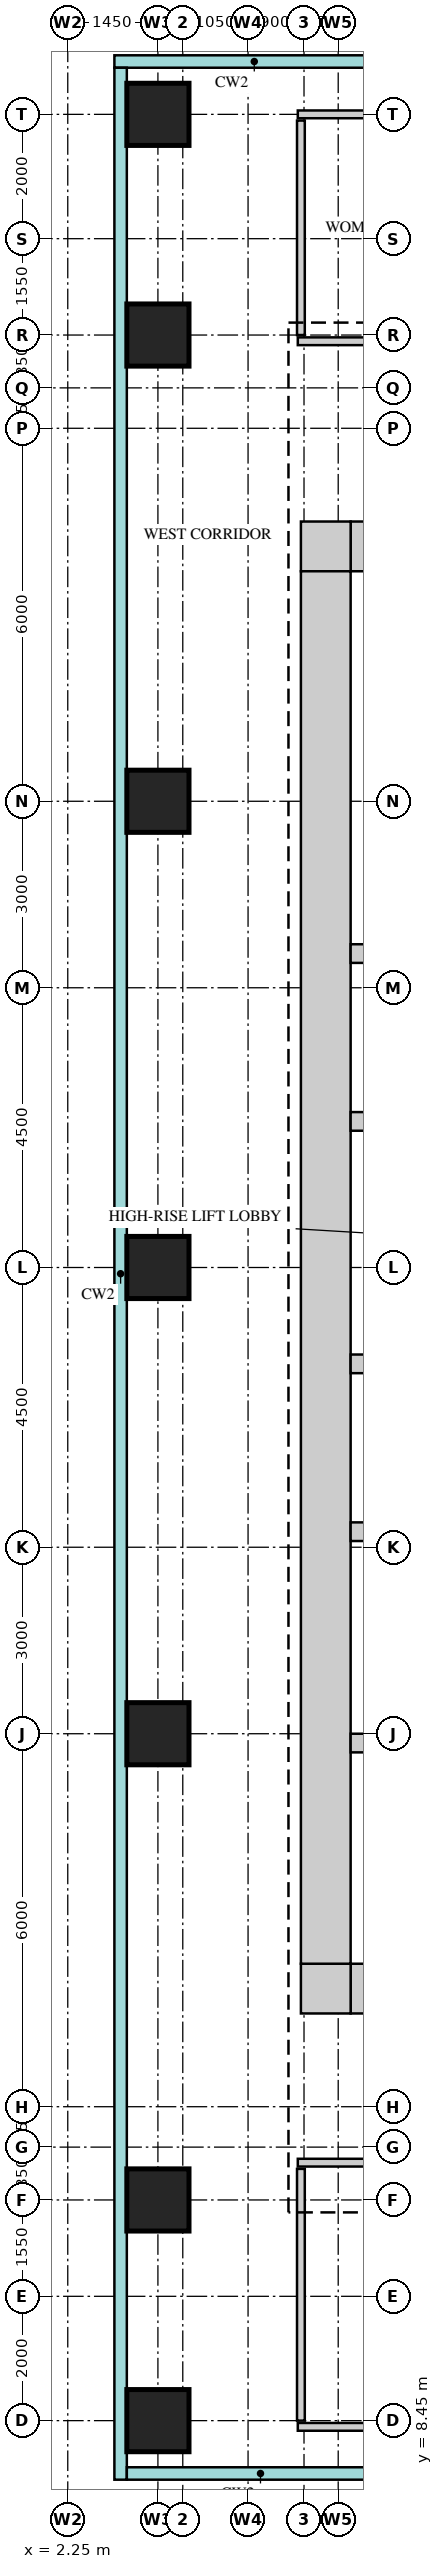
"""IFC4 building model, lengths in metres.
Left out: names, types, materials, properties, quantities, classifications, styles, units other than length and angle.
Written with IfcOpenShell. Run it as: python <this file> out.ifc"""

import sys

from ifc_helpers import new_model, si_unit, direction, frame, frame_2d, origin, origin_2d, place, context, subcontext, project, spatial, rectangle, extrude, source, transform, mapped, element, save


model = new_model("IFC4")
c1 = context("Model", 3, precision=1e-05, world=origin(), true_north=direction((0.0, 1.0)))
c2 = subcontext(c1, "Body", "Model", "MODEL_VIEW")
j1 = project(units=[si_unit("LENGTHUNIT", "METRE"), si_unit("PLANEANGLEUNIT", "RADIAN")], contexts=[c1])
p1 = place(None, origin())
s1 = spatial("IfcSite", under=j1, at=p1, CompositionType="ELEMENT")
p2 = place(p1, origin())
s2 = spatial("IfcBuilding", under=s1, at=p2, CompositionType="ELEMENT")
p3 = place(p2, frame((0.0, 0.0, 196.7)))
s3 = spatial("IfcBuildingStorey", under=s2, at=p3, CompositionType="ELEMENT", Elevation=196.7)
m1 = source(origin(), c2, "Body", "SweptSolid", [
    extrude(rectangle(XDim=13.4, YDim=0.8, at=frame_2d((6.7, 0.0))), origin(), (0.0, 0.0, 1.0), 3.75),
])
p4 = place(p3, frame((6.8, 38.6, 0.0), z_axis=(0.0, 0.0, 1.0), x_axis=(1.0, 0.0, 0.0)))
e1 = element("IfcWall", 1, at=p4, inside=s3, PredefinedType="SHEAR", context=c2, shape_type="MappedRepresentation", body=[
    mapped(m1, transform((0.0, 0.0, 0.0))),
])
m2 = source(origin(), c2, "Body", "SweptSolid", [
    extrude(rectangle(XDim=0.9, YDim=2.1, at=frame_2d((0.45, 1.05))), frame((0.0, 0.41, 0.0), z_axis=(0.0, -1.0, 0.0), x_axis=(1.0, 0.0, 0.0)), (0.0, 0.0, 1.0), 0.82),
])
p5 = place(p4, frame((1.75, 0.0, 0.0)))
e2 = element("IfcOpeningElement", 2, at=p5, cuts=e1, PredefinedType="OPENING", context=c2, shape_type="MappedRepresentation", body=[
    mapped(m2, transform((0.0, 0.0, 0.0))),
])
p6 = place(p4, frame((8.45, 0.0, 0.0)))
e3 = element("IfcOpeningElement", 3, at=p6, cuts=e1, PredefinedType="OPENING", context=c2, shape_type="MappedRepresentation", body=[
    mapped(m2, transform((0.0, 0.0, 0.0))),
])
m3 = source(origin(), c2, "Body", "SweptSolid", [
    extrude(rectangle(XDim=0.8, YDim=0.8, at=frame_2d((0.4, 0.0))), origin(), (0.0, 0.0, 1.0), 3.75),
])
p7 = place(p3, frame((6.0, 38.6, 0.0), z_axis=(0.0, 0.0, 1.0), x_axis=(1.0, 0.0, 0.0)))
e4 = element("IfcWall", 4, at=p7, inside=s3, PredefinedType="SHEAR", context=c2, shape_type="MappedRepresentation", body=[
    mapped(m3, transform((0.0, 0.0, 0.0))),
])
p8 = place(p3, frame((6.8, 15.4, 0.0), z_axis=(0.0, 0.0, 1.0), x_axis=(1.0, 0.0, 0.0)))
e5 = element("IfcWall", 5, at=p8, inside=s3, PredefinedType="SHEAR", context=c2, shape_type="MappedRepresentation", body=[
    mapped(m1, transform((0.0, 0.0, 0.0))),
])
m4 = source(origin(), c2, "Body", "SweptSolid", [
    extrude(rectangle(XDim=1.2, YDim=2.1, at=frame_2d((0.6, 1.05))), frame((0.0, 0.41, 0.0), z_axis=(0.0, -1.0, 0.0), x_axis=(1.0, 0.0, 0.0)), (0.0, 0.0, 1.0), 0.82),
])
p9 = place(p8, frame((5.4, 0.0, 0.0)))
e6 = element("IfcOpeningElement", 6, at=p9, cuts=e5, PredefinedType="OPENING", context=c2, shape_type="MappedRepresentation", body=[
    mapped(m4, transform((0.0, 0.0, 0.0))),
])
p10 = place(p8, frame((2.05, 0.0, 0.0)))
e7 = element("IfcOpeningElement", 7, at=p10, cuts=e5, PredefinedType="OPENING", context=c2, shape_type="MappedRepresentation", body=[
    mapped(m4, transform((0.0, 0.0, 0.0))),
])
m5 = source(origin(), c2, "Body", "SweptSolid", [
    extrude(rectangle(XDim=1.0, YDim=2.1, at=frame_2d((0.5, 1.05))), frame((0.0, 0.41, 0.0), z_axis=(0.0, -1.0, 0.0), x_axis=(1.0, 0.0, 0.0)), (0.0, 0.0, 1.0), 0.82),
])
p11 = place(p8, frame((7.9, 0.0, 0.0)))
e8 = element("IfcOpeningElement", 8, at=p11, cuts=e5, PredefinedType="OPENING", context=c2, shape_type="MappedRepresentation", body=[
    mapped(m5, transform((0.0, 0.0, 0.0))),
])
p12 = place(p3, frame((6.0, 15.4, 0.0), z_axis=(0.0, 0.0, 1.0), x_axis=(1.0, 0.0, 0.0)))
e9 = element("IfcWall", 9, at=p12, inside=s3, PredefinedType="SHEAR", context=c2, shape_type="MappedRepresentation", body=[
    mapped(m3, transform((0.0, 0.0, 0.0))),
])
m6 = source(origin(), c2, "Body", "SweptSolid", [
    extrude(rectangle(XDim=22.4, YDim=0.8, at=frame_2d((11.2, 0.0))), origin(), (0.0, 0.0, 1.0), 3.75),
])
p13 = place(p3, frame((6.4, 15.8, 0.0), z_axis=(0.0, 0.0, 1.0), x_axis=(0.0, 1.0, 0.0)))
e10 = element("IfcWall", 10, at=p13, inside=s3, PredefinedType="SHEAR", context=c2, shape_type="MappedRepresentation", body=[
    mapped(m6, transform((0.0, 0.0, 0.0))),
])
m7 = source(origin(), c2, "Body", "SweptSolid", [
    extrude(rectangle(XDim=13.4, YDim=0.3, at=frame_2d((6.7, 0.0))), origin(), (0.0, 0.0, 1.0), 3.75),
])
p14 = place(p3, frame((6.8, 22.75, 0.0), z_axis=(0.0, 0.0, 1.0), x_axis=(1.0, 0.0, 0.0)))
e11 = element("IfcWall", 11, at=p14, inside=s3, PredefinedType="STANDARD", context=c2, shape_type="MappedRepresentation", body=[
    mapped(m7, transform((0.0, 0.0, 0.0))),
])
m8 = source(origin(), c2, "Body", "SweptSolid", [
    extrude(rectangle(XDim=9.275, YDim=0.3, at=frame_2d((4.637, 0.0))), origin(), (0.0, 0.0, 1.0), 3.75),
])
p15 = place(p3, frame((6.8, 19.35, 0.0), z_axis=(0.0, 0.0, 1.0), x_axis=(1.0, 0.0, 0.0)))
e12 = element("IfcWall", 12, at=p15, inside=s3, PredefinedType="STANDARD", context=c2, shape_type="MappedRepresentation", body=[
    mapped(m8, transform((0.0, 0.0, 0.0))),
])
m9 = source(origin(), c2, "Body", "SweptSolid", [
    extrude(rectangle(XDim=1.2, YDim=2.1, at=frame_2d((0.6, 1.05))), frame((0.0, 0.16, 0.0), z_axis=(0.0, -1.0, 0.0), x_axis=(1.0, 0.0, 0.0)), (0.0, 0.0, 1.0), 0.32),
])
p16 = place(p15, frame((0.85, 0.0, 0.0)))
e13 = element("IfcOpeningElement", 13, at=p16, cuts=e12, PredefinedType="OPENING", context=c2, shape_type="MappedRepresentation", body=[
    mapped(m9, transform((0.0, 0.0, 0.0))),
])
p17 = place(p15, frame((3.2, 0.0, 0.0)))
e14 = element("IfcOpeningElement", 14, at=p17, cuts=e12, PredefinedType="OPENING", context=c2, shape_type="MappedRepresentation", body=[
    mapped(m9, transform((0.0, 0.0, 0.0))),
])
p18 = place(p15, frame((5.45, 0.0, 0.0)))
e15 = element("IfcOpeningElement", 15, at=p18, cuts=e12, PredefinedType="OPENING", context=c2, shape_type="MappedRepresentation", body=[
    mapped(m9, transform((0.0, 0.0, 0.0))),
])
p19 = place(p15, frame((7.6, 0.0, 0.0)))
e16 = element("IfcOpeningElement", 16, at=p19, cuts=e12, PredefinedType="OPENING", context=c2, shape_type="MappedRepresentation", body=[
    mapped(m9, transform((0.0, 0.0, 0.0))),
])
p20 = place(p3, frame((6.8, 32.05, 0.0), z_axis=(0.0, 0.0, 1.0), x_axis=(1.0, 0.0, 0.0)))
e17 = element("IfcWall", 17, at=p20, inside=s3, PredefinedType="STANDARD", context=c2, shape_type="MappedRepresentation", body=[
    mapped(m7, transform((0.0, 0.0, 0.0))),
])
p21 = place(p3, frame((6.8, 29.35, 0.0), z_axis=(0.0, 0.0, 1.0), x_axis=(1.0, 0.0, 0.0)))
e18 = element("IfcWall", 18, at=p21, inside=s3, PredefinedType="STANDARD", context=c2, shape_type="MappedRepresentation", body=[
    mapped(m7, transform((0.0, 0.0, 0.0))),
])
p22 = place(p21, frame((0.95, 0.0, 0.0)))
e19 = element("IfcOpeningElement", 19, at=p22, cuts=e18, PredefinedType="OPENING", context=c2, shape_type="MappedRepresentation", body=[
    mapped(m9, transform((0.0, 0.0, 0.0))),
])
p23 = place(p21, frame((3.5, 0.0, 0.0)))
e20 = element("IfcOpeningElement", 20, at=p23, cuts=e18, PredefinedType="OPENING", context=c2, shape_type="MappedRepresentation", body=[
    mapped(m9, transform((0.0, 0.0, 0.0))),
])
p24 = place(p21, frame((6.05, 0.0, 0.0)))
e21 = element("IfcOpeningElement", 21, at=p24, cuts=e18, PredefinedType="OPENING", context=c2, shape_type="MappedRepresentation", body=[
    mapped(m9, transform((0.0, 0.0, 0.0))),
])
p25 = place(p21, frame((8.6, 0.0, 0.0)))
e22 = element("IfcOpeningElement", 22, at=p25, cuts=e18, PredefinedType="OPENING", context=c2, shape_type="MappedRepresentation", body=[
    mapped(m9, transform((0.0, 0.0, 0.0))),
])
p26 = place(p21, frame((11.15, 0.0, 0.0)))
e23 = element("IfcOpeningElement", 23, at=p26, cuts=e18, PredefinedType="OPENING", context=c2, shape_type="MappedRepresentation", body=[
    mapped(m9, transform((0.0, 0.0, 0.0))),
])
p27 = place(p3, frame((6.8, 25.45, 0.0), z_axis=(0.0, 0.0, 1.0), x_axis=(1.0, 0.0, 0.0)))
e24 = element("IfcWall", 24, at=p27, inside=s3, PredefinedType="STANDARD", context=c2, shape_type="MappedRepresentation", body=[
    mapped(m7, transform((0.0, 0.0, 0.0))),
])
p28 = place(p27, frame((0.95, 0.0, 0.0)))
e25 = element("IfcOpeningElement", 25, at=p28, cuts=e24, PredefinedType="OPENING", context=c2, shape_type="MappedRepresentation", body=[
    mapped(m9, transform((0.0, 0.0, 0.0))),
])
p29 = place(p27, frame((3.5, 0.0, 0.0)))
e26 = element("IfcOpeningElement", 26, at=p29, cuts=e24, PredefinedType="OPENING", context=c2, shape_type="MappedRepresentation", body=[
    mapped(m9, transform((0.0, 0.0, 0.0))),
])
p30 = place(p27, frame((6.05, 0.0, 0.0)))
e27 = element("IfcOpeningElement", 27, at=p30, cuts=e24, PredefinedType="OPENING", context=c2, shape_type="MappedRepresentation", body=[
    mapped(m9, transform((0.0, 0.0, 0.0))),
])
p31 = place(p27, frame((8.6, 0.0, 0.0)))
e28 = element("IfcOpeningElement", 28, at=p31, cuts=e24, PredefinedType="OPENING", context=c2, shape_type="MappedRepresentation", body=[
    mapped(m9, transform((0.0, 0.0, 0.0))),
])
p32 = place(p27, frame((11.15, 0.0, 0.0)))
e29 = element("IfcOpeningElement", 29, at=p32, cuts=e24, PredefinedType="OPENING", context=c2, shape_type="MappedRepresentation", body=[
    mapped(m9, transform((0.0, 0.0, 0.0))),
])
m10 = source(origin(), c2, "Body", "SweptSolid", [
    extrude(rectangle(XDim=1.0, YDim=1.0, at=origin_2d()), origin(), (0.0, 0.0, 1.0), 3.75),
])
for number, where, z_axis, x_axis in (
    (30, (3.7, 8.45, 0.0), (0.0, 0.0, 1.0), (1.0, 0.0, 0.0)),
    (31, (3.7, 12.0, 0.0), (0.0, 0.0, 1.0), (1.0, 0.0, 0.0)),
    (32, (3.7, 19.5, 0.0), (0.0, 0.0, 1.0), (1.0, 0.0, 0.0)),
    (33, (3.7, 27.0, 0.0), (0.0, 0.0, 1.0), (1.0, 0.0, 0.0)),
    (34, (3.7, 34.5, 0.0), (0.0, 0.0, 1.0), (1.0, 0.0, 0.0)),
    (35, (3.7, 42.0, 0.0), (0.0, 0.0, 1.0), (1.0, 0.0, 0.0)),
    (36, (3.7, 45.55, 0.0), (0.0, 0.0, 1.0), (1.0, 0.0, 0.0)),
):
    element("IfcColumn", number, at=place(p3, frame(where, z_axis=z_axis, x_axis=x_axis)), inside=s3, PredefinedType="COLUMN", context=c2, shape_type="MappedRepresentation", body=[
        mapped(m10, transform((0.0, 0.0, 0.0))),
    ])
m11 = source(origin(), c2, "Body", "SweptSolid", [
    extrude(rectangle(XDim=7.95, YDim=0.125, at=frame_2d((3.975, 0.0))), origin(), (0.0, 0.0, 1.0), 3.25),
])
p33 = place(p3, frame((5.95, 8.35, 0.0), z_axis=(0.0, 0.0, 1.0), x_axis=(1.0, 0.0, 0.0)))
e37 = element("IfcWall", 37, at=p33, inside=s3, PredefinedType="PARTITIONING", context=c2, shape_type="MappedRepresentation", body=[
    mapped(m11, transform((0.0, 0.0, 0.0))),
])
m12 = source(origin(), c2, "Body", "SweptSolid", [
    extrude(rectangle(XDim=0.9, YDim=2.1, at=frame_2d((0.45, 1.05))), frame((0.0, 0.073, 0.0), z_axis=(0.0, -1.0, 0.0), x_axis=(1.0, 0.0, 0.0)), (0.0, 0.0, 1.0), 0.145),
])
p34 = place(p33, frame((3.8, 0.0, 0.0)))
e38 = element("IfcOpeningElement", 38, at=p34, cuts=e37, PredefinedType="OPENING", context=c2, shape_type="MappedRepresentation", body=[
    mapped(m12, transform((0.0, 0.0, 0.0))),
])
m13 = source(origin(), c2, "Body", "SweptSolid", [
    extrude(rectangle(XDim=4.05, YDim=0.125, at=frame_2d((2.025, 0.0))), origin(), (0.0, 0.0, 1.0), 3.8),
])
p35 = place(p3, frame((6.0, 8.45, 0.0), z_axis=(0.0, 0.0, 1.0), x_axis=(0.0, 1.0, 0.0)))
e39 = element("IfcWall", 39, at=p35, inside=s3, PredefinedType="PARTITIONING", context=c2, shape_type="MappedRepresentation", body=[
    mapped(m13, transform((0.0, 0.0, 0.0))),
])
m14 = source(origin(), c2, "Body", "SweptSolid", [
    extrude(rectangle(XDim=8.0, YDim=0.125, at=frame_2d((4.0, 0.0))), origin(), (0.0, 0.0, 1.0), 3.8),
])
p36 = place(p3, frame((5.95, 12.6, 0.0), z_axis=(0.0, 0.0, 1.0), x_axis=(1.0, 0.0, 0.0)))
e40 = element("IfcWall", 40, at=p36, inside=s3, PredefinedType="PARTITIONING", context=c2, shape_type="MappedRepresentation", body=[
    mapped(m14, transform((0.0, 0.0, 0.0))),
])
m15 = source(origin(), c2, "Body", "SweptSolid", [
    extrude(rectangle(XDim=7.95, YDim=0.125, at=frame_2d((3.975, 0.0))), origin(), (0.0, 0.0, 1.0), 3.8),
])
p37 = place(p3, frame((5.95, 41.9, 0.0), z_axis=(0.0, 0.0, 1.0), x_axis=(1.0, 0.0, 0.0)))
e41 = element("IfcWall", 41, at=p37, inside=s3, PredefinedType="PARTITIONING", context=c2, shape_type="MappedRepresentation", body=[
    mapped(m15, transform((0.0, 0.0, 0.0))),
])
p38 = place(p37, frame((1.55, 0.0, 0.0)))
e42 = element("IfcOpeningElement", 42, at=p38, cuts=e41, PredefinedType="OPENING", context=c2, shape_type="MappedRepresentation", body=[
    mapped(m12, transform((0.0, 0.0, 0.0))),
])
p39 = place(p37, frame((5.65, 0.0, 0.0)))
e43 = element("IfcOpeningElement", 43, at=p39, cuts=e41, PredefinedType="OPENING", context=c2, shape_type="MappedRepresentation", body=[
    mapped(m12, transform((0.0, 0.0, 0.0))),
])
m16 = source(origin(), c2, "Body", "SweptSolid", [
    extrude(rectangle(XDim=3.45, YDim=0.125, at=frame_2d((1.725, 0.0))), origin(), (0.0, 0.0, 1.0), 3.8),
])
p40 = place(p3, frame((6.0, 42.0, 0.0), z_axis=(0.0, 0.0, 1.0), x_axis=(0.0, 1.0, 0.0)))
e44 = element("IfcWall", 44, at=p40, inside=s3, PredefinedType="PARTITIONING", context=c2, shape_type="MappedRepresentation", body=[
    mapped(m16, transform((0.0, 0.0, 0.0))),
])
p41 = place(p3, frame((5.95, 45.55, 0.0), z_axis=(0.0, 0.0, 1.0), x_axis=(1.0, 0.0, 0.0)))
e45 = element("IfcWall", 45, at=p41, inside=s3, PredefinedType="PARTITIONING", context=c2, shape_type="MappedRepresentation", body=[
    mapped(m11, transform((0.0, 0.0, 0.0))),
])
save(model, sys.argv[1])
